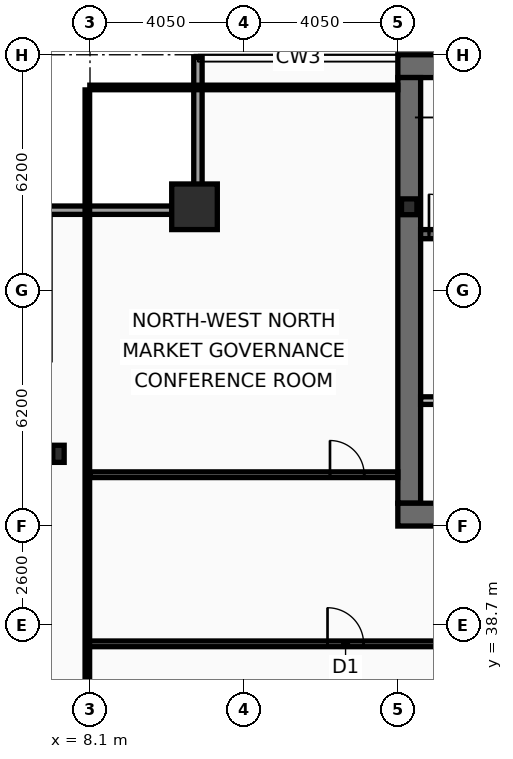
"""IFC4 building model, lengths in metres.
Left out: names, types, materials, properties, quantities, classifications, styles, units other than length and angle.
Written with IfcOpenShell. Run it as: python <this file> out.ifc"""

import sys

from ifc_helpers import new_model, si_unit, direction, frame, frame_2d, origin, origin_2d, place, context, subcontext, project, spatial, rectangle, hollow_rectangle, i_section, extrude, element, fill, save


model = new_model("IFC4")
c1 = context("Model", 3, precision=1e-05, world=origin(), true_north=direction((0.0, 1.0)))
c2 = subcontext(c1, "Body", "Model", "MODEL_VIEW")
j1 = project(units=[si_unit("LENGTHUNIT", "METRE"), si_unit("PLANEANGLEUNIT", "RADIAN")], contexts=[c1])
p1 = place(None, origin())
s1 = spatial("IfcSite", under=j1, at=p1, CompositionType="ELEMENT")
p2 = place(p1, origin())
s2 = spatial("IfcBuilding", under=s1, at=p2, CompositionType="ELEMENT")
p3 = place(p2, frame((0.0, 0.0, 228.2)))
s3 = spatial("IfcBuildingStorey", under=s2, at=p3, CompositionType="ELEMENT", Elevation=228.2)
p4 = place(p3, frame((16.2, 53.4, 0.0), z_axis=(0.0, 0.0, 1.0), x_axis=(1.0, 0.0, 0.0)))
e1 = element("IfcWall", 1, at=p4, inside=s3, PredefinedType="SHEAR", context=c2, shape_type="SweptSolid", body=[
    extrude(rectangle(XDim=40.5, YDim=0.6, at=frame_2d((20.25, 0.0))), origin(), (0.0, 0.0, 1.0), 3.44),
])
p5 = place(p3, frame((16.5, 41.9, 0.0), z_axis=(0.0, 0.0, 1.0), x_axis=(0.0, 1.0, 0.0)))
e2 = element("IfcWall", 2, at=p5, inside=s3, PredefinedType="SHEAR", context=c2, shape_type="SweptSolid", body=[
    extrude(rectangle(XDim=11.2, YDim=0.6, at=frame_2d((5.6, 0.0))), origin(), (0.0, 0.0, 1.0), 3.44),
])
p6 = place(p3, frame((18.65, 41.6, 0.0), z_axis=(0.0, 0.0, 1.0), x_axis=(-1.0, 0.0, 0.0)))
e3 = element("IfcWall", 3, at=p6, inside=s3, PredefinedType="SHEAR", context=c2, shape_type="SweptSolid", body=[
    extrude(rectangle(XDim=2.45, YDim=0.6, at=frame_2d((1.225, 0.0))), origin(), (0.0, 0.0, 1.0), 3.44),
])
p7 = place(p3, frame((16.8, 48.98, 0.0), z_axis=(0.0, 0.0, 1.0), x_axis=(1.0, 0.0, 0.0)))
e4 = element("IfcWall", 4, at=p7, inside=s3, PredefinedType="SHEAR", context=c2, shape_type="SweptSolid", body=[
    extrude(rectangle(XDim=7.42, YDim=0.24, at=frame_2d((3.71, 0.0))), origin(), (0.0, 0.0, 1.0), 3.44),
])
p8 = place(p7, frame((0.22, 0.0, 0.0)))
e5 = element("IfcOpeningElement", 5, at=p8, cuts=e4, PredefinedType="OPENING", context=c2, shape_type="SweptSolid", body=[
    extrude(rectangle(XDim=1.05, YDim=2.15, at=frame_2d((0.525, 1.075))), frame((0.0, 0.13, 0.0), z_axis=(0.0, -1.0, 0.0), x_axis=(1.0, 0.0, 0.0)), (0.0, 0.0, 1.0), 0.26),
])
p9 = place(p3, frame((10.85, 49.7, 0.0), z_axis=(0.0, 0.0, 1.0), x_axis=(1.0, 0.0, 0.0)))
e6 = element("IfcColumn", 6, at=p9, inside=s3, PredefinedType="COLUMN", context=c2, shape_type="SweptSolid", body=[
    extrude(hollow_rectangle(XDim=1.2, YDim=1.2, WallThickness=0.06, at=origin_2d()), origin(), (0.0, 0.0, 1.0), 3.6),
])
p10 = place(p3, frame((7.27, 43.2, 0.0), z_axis=(0.0, 0.0, 1.0), x_axis=(1.0, 0.0, 0.0)))
e7 = element("IfcColumn", 7, at=p10, inside=s3, PredefinedType="COLUMN", context=c2, shape_type="SweptSolid", body=[
    extrude(i_section(OverallWidth=0.3, OverallDepth=0.45, WebThickness=0.014, FlangeThickness=0.026, at=origin_2d()), origin(), (0.0, 0.0, 1.0), 3.6),
])
p11 = place(p3, frame((16.5, 49.7, 0.0), z_axis=(0.0, 0.0, 1.0), x_axis=(1.0, 0.0, 0.0)))
e8 = element("IfcColumn", 8, at=p11, inside=s3, PredefinedType="COLUMN", context=c2, shape_type="SweptSolid", body=[
    extrude(i_section(OverallWidth=0.406, OverallDepth=0.416, WebThickness=0.03, FlangeThickness=0.048, at=origin_2d()), origin(), (0.0, 0.0, 1.0), 3.6),
])
p12 = place(p3, frame((6.83, 49.61, 0.0), z_axis=(0.0, 0.0, 1.0), x_axis=(1.0, 0.0, 0.0)))
e9 = element("IfcWall", 9, at=p12, inside=s3, PredefinedType="SOLIDWALL", context=c2, shape_type="SweptSolid", body=[
    extrude(rectangle(XDim=4.22, YDim=0.22, at=frame_2d((2.11, 0.0))), origin(), (0.0, 0.0, 1.0), 2.83),
])
p13 = place(p3, frame((10.94, 49.72, 0.0), z_axis=(0.0, 0.0, 1.0), x_axis=(0.0, 1.0, 0.0)))
e10 = element("IfcWall", 10, at=p13, inside=s3, PredefinedType="SOLIDWALL", context=c2, shape_type="SweptSolid", body=[
    extrude(rectangle(XDim=3.91, YDim=0.22, at=frame_2d((1.955, 0.0))), origin(), (0.0, 0.0, 1.0), 2.83),
])
p14 = place(p3, frame((16.8, 44.6, 0.0), z_axis=(0.0, 0.0, 1.0), x_axis=(1.0, 0.0, 0.0)))
e11 = element("IfcWall", 11, at=p14, inside=s3, PredefinedType="PARTITIONING", context=c2, shape_type="SweptSolid", body=[
    extrude(rectangle(XDim=4.2, YDim=0.2, at=frame_2d((2.1, 0.0))), origin(), (0.0, 0.0, 1.0), 3.44),
])
p15 = place(p14, frame((1.25, 0.0, 0.0)))
e12 = element("IfcOpeningElement", 12, at=p15, cuts=e11, PredefinedType="OPENING", context=c2, shape_type="SweptSolid", body=[
    extrude(rectangle(XDim=1.05, YDim=2.15, at=frame_2d((0.525, 1.075))), frame((0.0, 0.11, 0.0), z_axis=(0.0, -1.0, 0.0), x_axis=(1.0, 0.0, 0.0)), (0.0, 0.0, 1.0), 0.22),
])
p16 = place(p3, frame((8.03, 38.2, 0.0), z_axis=(0.0, 0.0, 1.0), x_axis=(1.0, 0.0, 0.0)))
e13 = element("IfcWall", 13, at=p16, inside=s3, PredefinedType="PARTITIONING", context=c2, shape_type="SweptSolid", body=[
    extrude(rectangle(XDim=10.52, YDim=0.15, at=frame_2d((5.26, 0.0))), origin(), (0.0, 0.0, 1.0), 2.78),
])
p17 = place(p16, frame((6.32, 0.0, 0.0)))
e14 = element("IfcOpeningElement", 14, at=p17, cuts=e13, PredefinedType="OPENING", context=c2, shape_type="SweptSolid", body=[
    extrude(rectangle(XDim=0.95, YDim=2.05, at=frame_2d((0.475, 1.025))), frame((0.0, 0.085, 0.0), z_axis=(0.0, -1.0, 0.0), x_axis=(1.0, 0.0, 0.0)), (0.0, 0.0, 1.0), 0.17),
])
p18 = place(p3, frame((8.095, 42.65, 0.0), z_axis=(0.0, 0.0, 1.0), x_axis=(1.0, 0.0, 0.0)))
e15 = element("IfcWall", 15, at=p18, inside=s3, PredefinedType="PARTITIONING", context=c2, shape_type="SweptSolid", body=[
    extrude(rectangle(XDim=8.105, YDim=0.15, at=frame_2d((4.052, 0.0))), origin(), (0.0, 0.0, 1.0), 2.78),
])
p19 = place(p18, frame((6.32, 0.0, 0.0)))
e16 = element("IfcOpeningElement", 16, at=p19, cuts=e15, PredefinedType="OPENING", context=c2, shape_type="SweptSolid", body=[
    extrude(rectangle(XDim=0.9, YDim=2.05, at=frame_2d((0.45, 1.025))), frame((0.0, 0.085, 0.0), z_axis=(0.0, -1.0, 0.0), x_axis=(1.0, 0.0, 0.0)), (0.0, 0.0, 1.0), 0.17),
])
p20 = place(p3, frame((8.03, 10.665, 0.0), z_axis=(0.0, 0.0, 1.0), x_axis=(0.0, 1.0, 0.0)))
e17 = element("IfcWall", 17, at=p20, inside=s3, PredefinedType="PARTITIONING", context=c2, shape_type="SweptSolid", body=[
    extrude(rectangle(XDim=42.11, YDim=0.12, at=frame_2d((21.055, 0.0))), origin(), (0.0, 0.0, 1.0), 2.78),
])
p21 = place(p3, frame((8.095, 52.84, 0.0), z_axis=(0.0, 0.0, 1.0), x_axis=(1.0, 0.0, 0.0)))
e18 = element("IfcWall", 18, at=p21, inside=s3, PredefinedType="PARTITIONING", context=c2, shape_type="SweptSolid", body=[
    extrude(rectangle(XDim=8.105, YDim=0.12, at=frame_2d((4.052, 0.0))), origin(), (0.0, 0.0, 1.0), 3.44),
])
p22 = place(p8, origin())
e19 = element("IfcDoor", 19, at=p22, inside=s3, OperationType="SINGLE_SWING_LEFT", PredefinedType="DOOR", context=c2, shape_type="SweptSolid", body=[
    extrude(rectangle(XDim=1.05, YDim=2.15, at=frame_2d((0.525, 1.075))), frame((0.0, 0.025, 0.0), z_axis=(0.0, -1.0, 0.0), x_axis=(1.0, 0.0, 0.0)), (0.0, 0.0, 1.0), 0.05),
])
fill(e5, e19)
p23 = place(p17, origin())
e20 = element("IfcDoor", 20, at=p23, inside=s3, OperationType="SINGLE_SWING_LEFT", PredefinedType="DOOR", context=c2, shape_type="SweptSolid", body=[
    extrude(rectangle(XDim=0.95, YDim=2.05, at=frame_2d((0.475, 1.025))), frame((0.0, 0.025, 0.0), z_axis=(0.0, -1.0, 0.0), x_axis=(1.0, 0.0, 0.0)), (0.0, 0.0, 1.0), 0.05),
])
fill(e14, e20)
p24 = place(p19, origin())
e21 = element("IfcDoor", 21, at=p24, inside=s3, OperationType="SINGLE_SWING_LEFT", PredefinedType="DOOR", context=c2, shape_type="SweptSolid", body=[
    extrude(rectangle(XDim=0.9, YDim=2.05, at=frame_2d((0.45, 1.025))), frame((0.0, 0.025, 0.0), z_axis=(0.0, -1.0, 0.0), x_axis=(1.0, 0.0, 0.0)), (0.0, 0.0, 1.0), 0.05),
])
fill(e16, e21)
save(model, sys.argv[1])
